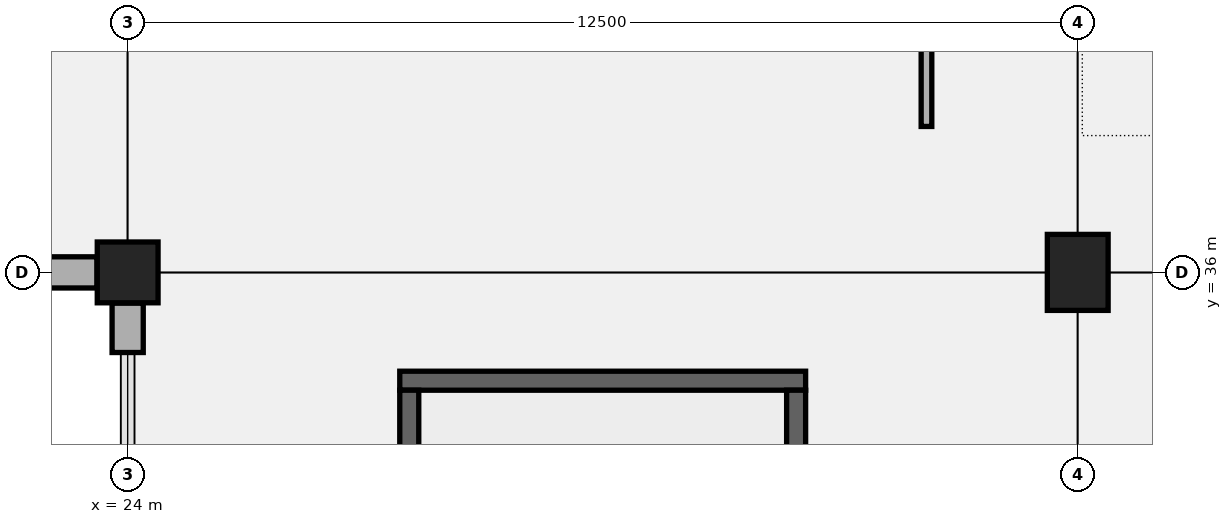
"""IFC4 building model, lengths in metres.
Left out: names, types, materials, properties, quantities, classifications, styles, units other than length and angle.
Written with IfcOpenShell. Run it as: python <this file> out.ifc"""

import sys

from ifc_helpers import new_model, si_unit, direction, frame, frame_2d, origin, origin_2d, place, context, subcontext, project, spatial, rectangle, extrude, element, save


model = new_model("IFC4")
c1 = context("Model", 3, precision=1e-05, world=origin(), true_north=direction((0.0, 1.0)))
c2 = subcontext(c1, "Body", "Model", "MODEL_VIEW")
j1 = project(units=[si_unit("LENGTHUNIT", "METRE"), si_unit("PLANEANGLEUNIT", "RADIAN")], contexts=[c1])
p1 = place(None, origin())
s1 = spatial("IfcSite", under=j1, at=p1, CompositionType="ELEMENT")
p2 = place(p1, origin())
s2 = spatial("IfcBuilding", under=s1, at=p2, CompositionType="ELEMENT")
p3 = place(p2, frame((0.0, 0.0, 5.4)))
s3 = spatial("IfcBuildingStorey", under=s2, at=p3, CompositionType="ELEMENT", Elevation=5.4)
p4 = place(p3, frame((24.0, 36.0, 0.0), z_axis=(0.0, 0.0, 1.0), x_axis=(1.0, 0.0, 0.0)))
e1 = element("IfcColumn", 1, at=p4, inside=s3, PredefinedType="COLUMN", context=c2, shape_type="SweptSolid", body=[
    extrude(rectangle(XDim=0.8, YDim=0.8, at=origin_2d()), origin(), (0.0, 0.0, 1.0), 4.8),
])
p5 = place(p3, frame((36.5, 36.0, 0.0), z_axis=(0.0, 0.0, 1.0), x_axis=(1.0, 0.0, 0.0)))
e2 = element("IfcColumn", 2, at=p5, inside=s3, PredefinedType="COLUMN", context=c2, shape_type="SweptSolid", body=[
    extrude(rectangle(XDim=0.8, YDim=1.0, at=origin_2d()), origin(), (0.0, 0.0, 1.0), 4.8),
])
for number, where, z_axis, x_axis in (
    (3, (22.946, 36.0, 0.0), (0.0, 0.0, 1.0), (1.0, 0.0, 0.0)),
    (4, (24.0, 34.946, 0.0), (0.0, 0.0, 1.0), (0.0, 1.0, 0.0)),
):
    element("IfcWall", number, at=place(p3, frame(where, z_axis=z_axis, x_axis=x_axis)), inside=s3, PredefinedType="SOLIDWALL", context=c2, shape_type="SweptSolid", body=[
        extrude(rectangle(XDim=0.65, YDim=0.41, at=frame_2d((0.325, 0.0))), origin(), (0.0, 0.0, 1.0), 4.15),
    ])
p6 = place(p3, frame((27.58, 34.575, 0.0), z_axis=(0.0, 0.0, 1.0), x_axis=(1.0, 0.0, 0.0)))
e5 = element("IfcWall", 5, at=p6, inside=s3, PredefinedType="SHEAR", context=c2, shape_type="SweptSolid", body=[
    extrude(rectangle(XDim=5.34, YDim=0.25, at=frame_2d((2.67, 0.0))), origin(), (0.0, 0.0, 1.0), 4.55),
])
for number, where, z_axis, x_axis in (
    (6, (27.705, 25.55, 0.0), (0.0, 0.0, 1.0), (0.0, 1.0, 0.0)),
    (7, (32.795, 25.55, 0.0), (0.0, 0.0, 1.0), (0.0, 1.0, 0.0)),
):
    element("IfcWall", number, at=place(p3, frame(where, z_axis=z_axis, x_axis=x_axis)), inside=s3, PredefinedType="SHEAR", context=c2, shape_type="SweptSolid", body=[
        extrude(rectangle(XDim=8.9, YDim=0.25, at=frame_2d((4.45, 0.0))), origin(), (0.0, 0.0, 1.0), 4.55),
    ])
p7 = place(p3, frame((34.51, 37.92, 0.0), z_axis=(0.0, 0.0, 1.0), x_axis=(0.0, 1.0, 0.0)))
e8 = element("IfcWall", 8, at=p7, inside=s3, PredefinedType="PARTITIONING", context=c2, shape_type="SweptSolid", body=[
    extrude(rectangle(XDim=9.92, YDim=0.14, at=frame_2d((4.96, 0.0))), origin(), (0.0, 0.0, 1.0), 3.92),
])
p8 = place(p7, frame((4.485, 0.0, 0.0)))
e9 = element("IfcOpeningElement", 9, at=p8, cuts=e8, PredefinedType="OPENING", context=c2, shape_type="SweptSolid", body=[
    extrude(rectangle(XDim=0.95, YDim=2.12, at=frame_2d((0.475, 1.06))), frame((0.0, 0.08, 0.0), z_axis=(0.0, -1.0, 0.0), x_axis=(1.0, 0.0, 0.0)), (0.0, 0.0, 1.0), 0.16),
])
save(model, sys.argv[1])
